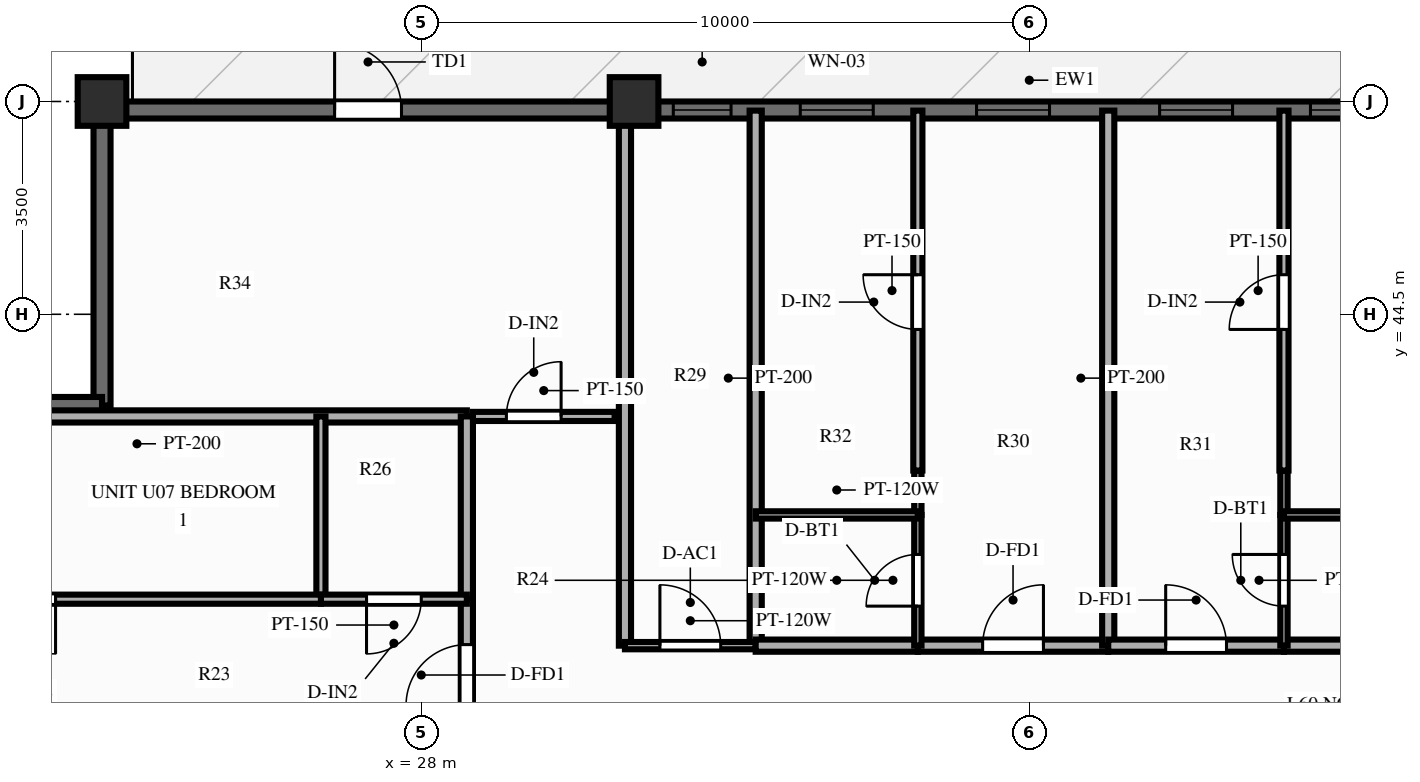
"""IFC4 building model, lengths in metres.
Left out: names, types, materials, properties, quantities, classifications, styles, units other than length and angle.
Written with IfcOpenShell. Run it as: python <this file> out.ifc"""

import sys

from ifc_helpers import new_model, si_unit, direction, frame, frame_2d, origin, origin_2d, place, context, subcontext, project, spatial, rectangle, extrude, source, transform, mapped, element, fill, save


model = new_model("IFC4")
c1 = context("Model", 3, precision=1e-05, world=origin(), true_north=direction((0.0, 1.0)))
c2 = subcontext(c1, "Body", "Model", "MODEL_VIEW")
j1 = project(units=[si_unit("LENGTHUNIT", "METRE"), si_unit("PLANEANGLEUNIT", "RADIAN")], contexts=[c1])
p1 = place(None, origin())
s1 = spatial("IfcSite", under=j1, at=p1, CompositionType="ELEMENT")
p2 = place(p1, origin())
s2 = spatial("IfcBuilding", under=s1, at=p2, CompositionType="ELEMENT")
p3 = place(p2, frame((0.0, 0.0, 192.7)))
s3 = spatial("IfcBuildingStorey", under=s2, at=p3, CompositionType="ELEMENT", Elevation=192.7)
m1 = source(origin(), c2, "Body", "SweptSolid", [
    extrude(rectangle(XDim=0.8, YDim=0.8, at=origin_2d()), origin(), (0.0, 0.0, 1.0), 3.9),
])
for number, where, z_axis, x_axis in (
    (1, (31.5, 48.0, 0.0), (0.0, 0.0, 1.0), (1.0, 0.0, 0.0)),
    (2, (22.75, 48.0, 0.0), (0.0, 0.0, 1.0), (1.0, 0.0, 0.0)),
):
    element("IfcColumn", number, at=place(p3, frame(where, z_axis=z_axis, x_axis=x_axis)), inside=s3, PredefinedType="COLUMN", context=c2, shape_type="MappedRepresentation", body=[
        mapped(m1, transform((0.0, 0.0, 0.0), scale=1.0)),
    ])
p4 = place(p3, frame((22.75, 47.86, 0.0), z_axis=(0.0, 0.0, 1.0), x_axis=(1.0, 0.0, 0.0)))
e3 = element("IfcWall", 3, at=p4, inside=s3, PredefinedType="SOLIDWALL", context=c2, shape_type="SweptSolid", body=[
    extrude(rectangle(XDim=30.5, YDim=0.28, at=frame_2d((15.25, 0.0))), origin(), (0.0, 0.0, 1.0), 2.44),
])
p5 = place(p4, frame((3.825, 0.0, 0.0)))
e4 = element("IfcOpeningElement", 4, at=p5, cuts=e3, PredefinedType="OPENING", context=c2, shape_type="SweptSolid", body=[
    extrude(rectangle(XDim=1.1, YDim=2.15, at=frame_2d((0.55, 1.075))), frame((0.0, 0.152, 0.0), z_axis=(0.0, -1.0, 0.0), x_axis=(1.0, 0.0, 0.0)), (0.0, 0.0, 1.0), 0.304),
])
p6 = place(p4, frame((9.395, 0.0, 0.25)))
e5 = element("IfcOpeningElement", 5, at=p6, cuts=e3, PredefinedType="OPENING", context=c2, shape_type="SweptSolid", body=[
    extrude(rectangle(XDim=0.95, YDim=1.5, at=frame_2d((0.475, 0.75))), frame((0.0, 0.152, 0.0), z_axis=(0.0, -1.0, 0.0), x_axis=(1.0, 0.0, 0.0)), (0.0, 0.0, 1.0), 0.304),
])
p7 = place(p4, frame((11.483, 0.0, 0.25)))
e6 = element("IfcOpeningElement", 6, at=p7, cuts=e3, PredefinedType="OPENING", context=c2, shape_type="SweptSolid", body=[
    extrude(rectangle(XDim=1.2, YDim=1.5, at=frame_2d((0.6, 0.75))), frame((0.0, 0.152, 0.0), z_axis=(0.0, -1.0, 0.0), x_axis=(1.0, 0.0, 0.0)), (0.0, 0.0, 1.0), 0.304),
])
p8 = place(p4, frame((14.383, 0.0, 0.25)))
e7 = element("IfcOpeningElement", 7, at=p8, cuts=e3, PredefinedType="OPENING", context=c2, shape_type="SweptSolid", body=[
    extrude(rectangle(XDim=1.2, YDim=1.5, at=frame_2d((0.6, 0.75))), frame((0.0, 0.152, 0.0), z_axis=(0.0, -1.0, 0.0), x_axis=(1.0, 0.0, 0.0)), (0.0, 0.0, 1.0), 0.304),
])
p9 = place(p4, frame((17.393, 0.0, 0.25)))
e8 = element("IfcOpeningElement", 8, at=p9, cuts=e3, PredefinedType="OPENING", context=c2, shape_type="SweptSolid", body=[
    extrude(rectangle(XDim=1.2, YDim=1.5, at=frame_2d((0.6, 0.75))), frame((0.0, 0.152, 0.0), z_axis=(0.0, -1.0, 0.0), x_axis=(1.0, 0.0, 0.0)), (0.0, 0.0, 1.0), 0.304),
])
p10 = place(p4, frame((19.874, 0.0, 0.25)))
e9 = element("IfcOpeningElement", 9, at=p10, cuts=e3, PredefinedType="OPENING", context=c2, shape_type="SweptSolid", body=[
    extrude(rectangle(XDim=1.2, YDim=1.5, at=frame_2d((0.6, 0.75))), frame((0.0, 0.152, 0.0), z_axis=(0.0, -1.0, 0.0), x_axis=(1.0, 0.0, 0.0)), (0.0, 0.0, 1.0), 0.304),
])
p11 = place(p4, frame((25.525, 0.0, 0.25)))
e10 = element("IfcOpeningElement", 10, at=p11, cuts=e3, PredefinedType="OPENING", context=c2, shape_type="SweptSolid", body=[
    extrude(rectangle(XDim=1.2, YDim=1.5, at=frame_2d((0.6, 0.75))), frame((0.0, 0.152, 0.0), z_axis=(0.0, -1.0, 0.0), x_axis=(1.0, 0.0, 0.0)), (0.0, 0.0, 1.0), 0.304),
])
for number, where, z_axis, x_axis in (
    (11, (22.75, 43.0, 0.0), (0.0, 0.0, 1.0), (0.0, 1.0, 0.0)),
    (12, (17.83, 43.0, 0.0), (0.0, 0.0, 1.0), (1.0, 0.0, 0.0)),
):
    element("IfcWall", number, at=place(p3, frame(where, z_axis=z_axis, x_axis=x_axis)), inside=s3, PredefinedType="SOLIDWALL", context=c2, shape_type="SweptSolid", body=[
        extrude(rectangle(XDim=4.92, YDim=0.28, at=frame_2d((2.46, 0.0))), origin(), (0.0, 0.0, 1.0), 2.44),
    ])
p12 = place(p3, frame((28.85, 42.82, 0.0), z_axis=(0.0, 0.0, 1.0), x_axis=(1.0, 0.0, 0.0)))
e13 = element("IfcWall", 13, at=p12, inside=s3, PredefinedType="PARTITIONING", context=c2, shape_type="SweptSolid", body=[
    extrude(rectangle(XDim=2.33, YDim=0.15, at=frame_2d((1.165, 0.0))), origin(), (0.0, 0.0, 1.0), 2.24),
])
p13 = place(p12, frame((0.55, 0.0, 0.0)))
e14 = element("IfcOpeningElement", 14, at=p13, cuts=e13, PredefinedType="OPENING", context=c2, shape_type="SweptSolid", body=[
    extrude(rectangle(XDim=0.9, YDim=2.1, at=frame_2d((0.45, 1.05))), frame((0.0, 0.087, 0.0), z_axis=(0.0, -1.0, 0.0), x_axis=(1.0, 0.0, 0.0)), (0.0, 0.0, 1.0), 0.174),
])
p14 = place(p3, frame((31.35, 39.05, 0.0), z_axis=(0.0, 0.0, 1.0), x_axis=(0.0, 1.0, 0.0)))
e15 = element("IfcWall", 15, at=p14, inside=s3, PredefinedType="PARTITIONING", context=c2, shape_type="SweptSolid", body=[
    extrude(rectangle(XDim=8.8, YDim=0.2, at=frame_2d((4.4, 0.0))), origin(), (0.0, 0.0, 1.0), 2.44),
])
p15 = place(p3, frame((33.5, 39.05, 0.0), z_axis=(0.0, 0.0, 1.0), x_axis=(0.0, 1.0, 0.0)))
e16 = element("IfcWall", 16, at=p15, inside=s3, PredefinedType="PARTITIONING", context=c2, shape_type="SweptSolid", body=[
    extrude(rectangle(XDim=8.8, YDim=0.2, at=frame_2d((4.4, 0.0))), origin(), (0.0, 0.0, 1.0), 3.56),
])
p16 = place(p3, frame((31.35, 39.05, 0.0), z_axis=(0.0, 0.0, 1.0), x_axis=(1.0, 0.0, 0.0)))
e17 = element("IfcWall", 17, at=p16, inside=s3, PredefinedType="PARTITIONING", context=c2, shape_type="SweptSolid", body=[
    extrude(rectangle(XDim=2.15, YDim=0.12, at=frame_2d((1.075, 0.0))), origin(), (0.0, 0.0, 1.0), 3.56),
])
p17 = place(p16, frame((0.575, 0.0, 0.0)))
e18 = element("IfcOpeningElement", 18, at=p17, cuts=e17, PredefinedType="OPENING", context=c2, shape_type="SweptSolid", body=[
    extrude(rectangle(XDim=1.0, YDim=2.1, at=frame_2d((0.5, 1.05))), frame((0.0, 0.072, 0.0), z_axis=(0.0, -1.0, 0.0), x_axis=(1.0, 0.0, 0.0)), (0.0, 0.0, 1.0), 0.144),
])
p18 = place(p3, frame((33.5, 39.05, 0.0), z_axis=(0.0, 0.0, 1.0), x_axis=(1.0, 0.0, 0.0)))
e19 = element("IfcWall", 19, at=p18, inside=s3, PredefinedType="PARTITIONING", context=c2, shape_type="SweptSolid", body=[
    extrude(rectangle(XDim=2.667, YDim=0.2, at=frame_2d((1.333, 0.0))), origin(), (0.0, 0.0, 1.0), 3.56),
])
p19 = place(p3, frame((36.167, 39.05, 0.0), z_axis=(0.0, 0.0, 1.0), x_axis=(1.0, 0.0, 0.0)))
e20 = element("IfcWall", 20, at=p19, inside=s3, PredefinedType="PARTITIONING", context=c2, shape_type="SweptSolid", body=[
    extrude(rectangle(XDim=3.131, YDim=0.2, at=frame_2d((1.565, 0.0))), origin(), (0.0, 0.0, 1.0), 3.56),
])
p20 = place(p19, frame((1.065, 0.0, 0.0)))
e21 = element("IfcOpeningElement", 21, at=p20, cuts=e20, PredefinedType="OPENING", context=c2, shape_type="SweptSolid", body=[
    extrude(rectangle(XDim=1.0, YDim=2.15, at=frame_2d((0.5, 1.075))), frame((0.0, 0.112, 0.0), z_axis=(0.0, -1.0, 0.0), x_axis=(1.0, 0.0, 0.0)), (0.0, 0.0, 1.0), 0.224),
])
p21 = place(p3, frame((36.167, 39.05, 0.0), z_axis=(0.0, 0.0, 1.0), x_axis=(0.0, 1.0, 0.0)))
e22 = element("IfcWall", 22, at=p21, inside=s3, PredefinedType="PARTITIONING", context=c2, shape_type="SweptSolid", body=[
    extrude(rectangle(XDim=2.15, YDim=0.12, at=frame_2d((1.075, 0.0))), origin(), (0.0, 0.0, 1.0), 3.56),
])
p22 = place(p21, frame((0.65, 0.0, 0.0)))
e23 = element("IfcOpeningElement", 23, at=p22, cuts=e22, PredefinedType="OPENING", context=c2, shape_type="SweptSolid", body=[
    extrude(rectangle(XDim=0.85, YDim=2.05, at=frame_2d((0.425, 1.025))), frame((0.0, 0.072, 0.0), z_axis=(0.0, -1.0, 0.0), x_axis=(1.0, 0.0, 0.0)), (0.0, 0.0, 1.0), 0.144),
])
p23 = place(p3, frame((36.167, 41.2, 0.0), z_axis=(0.0, 0.0, 1.0), x_axis=(0.0, 1.0, 0.0)))
e24 = element("IfcWall", 24, at=p23, inside=s3, PredefinedType="PARTITIONING", context=c2, shape_type="SweptSolid", body=[
    extrude(rectangle(XDim=0.73, YDim=0.12, at=frame_2d((0.365, 0.0))), origin(), (0.0, 0.0, 1.0), 3.56),
])
p24 = place(p3, frame((33.5, 41.2, 0.0), z_axis=(0.0, 0.0, 1.0), x_axis=(1.0, 0.0, 0.0)))
e25 = element("IfcWall", 25, at=p24, inside=s3, PredefinedType="PARTITIONING", context=c2, shape_type="SweptSolid", body=[
    extrude(rectangle(XDim=2.667, YDim=0.12, at=frame_2d((1.333, 0.0))), origin(), (0.0, 0.0, 1.0), 3.56),
])
p25 = place(p3, frame((36.167, 41.93, 0.0), z_axis=(0.0, 0.0, 1.0), x_axis=(0.0, 1.0, 0.0)))
e26 = element("IfcWall", 26, at=p25, inside=s3, PredefinedType="PARTITIONING", context=c2, shape_type="SweptSolid", body=[
    extrude(rectangle(XDim=5.92, YDim=0.15, at=frame_2d((2.96, 0.0))), origin(), (0.0, 0.0, 1.0), 3.56),
])
p26 = place(p25, frame((2.321, 0.0, 0.0)))
e27 = element("IfcOpeningElement", 27, at=p26, cuts=e26, PredefinedType="OPENING", context=c2, shape_type="SweptSolid", body=[
    extrude(rectangle(XDim=0.9, YDim=2.1, at=frame_2d((0.45, 1.05))), frame((0.0, 0.087, 0.0), z_axis=(0.0, -1.0, 0.0), x_axis=(1.0, 0.0, 0.0)), (0.0, 0.0, 1.0), 0.174),
])
p27 = place(p3, frame((39.298, 39.05, 0.0), z_axis=(0.0, 0.0, 1.0), x_axis=(0.0, 1.0, 0.0)))
e28 = element("IfcWall", 28, at=p27, inside=s3, PredefinedType="PARTITIONING", context=c2, shape_type="SweptSolid", body=[
    extrude(rectangle(XDim=8.8, YDim=0.2, at=frame_2d((4.4, 0.0))), origin(), (0.0, 0.0, 1.0), 3.56),
])
p28 = place(p3, frame((39.298, 39.05, 0.0), z_axis=(0.0, 0.0, 1.0), x_axis=(1.0, 0.0, 0.0)))
e29 = element("IfcWall", 29, at=p28, inside=s3, PredefinedType="PARTITIONING", context=c2, shape_type="SweptSolid", body=[
    extrude(rectangle(XDim=2.89, YDim=0.2, at=frame_2d((1.445, 0.0))), origin(), (0.0, 0.0, 1.0), 3.56),
])
p29 = place(p28, frame((0.945, 0.0, 0.0)))
e30 = element("IfcOpeningElement", 30, at=p29, cuts=e29, PredefinedType="OPENING", context=c2, shape_type="SweptSolid", body=[
    extrude(rectangle(XDim=1.0, YDim=2.15, at=frame_2d((0.5, 1.075))), frame((0.0, 0.112, 0.0), z_axis=(0.0, -1.0, 0.0), x_axis=(1.0, 0.0, 0.0)), (0.0, 0.0, 1.0), 0.224),
])
p30 = place(p3, frame((42.188, 39.05, 0.0), z_axis=(0.0, 0.0, 1.0), x_axis=(1.0, 0.0, 0.0)))
e31 = element("IfcWall", 31, at=p30, inside=s3, PredefinedType="PARTITIONING", context=c2, shape_type="SweptSolid", body=[
    extrude(rectangle(XDim=2.462, YDim=0.2, at=frame_2d((1.231, 0.0))), origin(), (0.0, 0.0, 1.0), 3.56),
])
p31 = place(p3, frame((42.188, 39.05, 0.0), z_axis=(0.0, 0.0, 1.0), x_axis=(0.0, 1.0, 0.0)))
e32 = element("IfcWall", 32, at=p31, inside=s3, PredefinedType="PARTITIONING", context=c2, shape_type="SweptSolid", body=[
    extrude(rectangle(XDim=2.15, YDim=0.12, at=frame_2d((1.075, 0.0))), origin(), (0.0, 0.0, 1.0), 3.56),
])
p32 = place(p31, frame((0.65, 0.0, 0.0)))
e33 = element("IfcOpeningElement", 33, at=p32, cuts=e32, PredefinedType="OPENING", context=c2, shape_type="SweptSolid", body=[
    extrude(rectangle(XDim=0.85, YDim=2.05, at=frame_2d((0.425, 1.025))), frame((0.0, 0.072, 0.0), z_axis=(0.0, -1.0, 0.0), x_axis=(1.0, 0.0, 0.0)), (0.0, 0.0, 1.0), 0.144),
])
p33 = place(p3, frame((42.188, 41.2, 0.0), z_axis=(0.0, 0.0, 1.0), x_axis=(0.0, 1.0, 0.0)))
e34 = element("IfcWall", 34, at=p33, inside=s3, PredefinedType="PARTITIONING", context=c2, shape_type="SweptSolid", body=[
    extrude(rectangle(XDim=0.73, YDim=0.12, at=frame_2d((0.365, 0.0))), origin(), (0.0, 0.0, 1.0), 3.56),
])
p34 = place(p3, frame((42.188, 41.2, 0.0), z_axis=(0.0, 0.0, 1.0), x_axis=(1.0, 0.0, 0.0)))
e35 = element("IfcWall", 35, at=p34, inside=s3, PredefinedType="PARTITIONING", context=c2, shape_type="SweptSolid", body=[
    extrude(rectangle(XDim=2.462, YDim=0.12, at=frame_2d((1.231, 0.0))), origin(), (0.0, 0.0, 1.0), 3.56),
])
p35 = place(p3, frame((42.188, 41.93, 0.0), z_axis=(0.0, 0.0, 1.0), x_axis=(0.0, 1.0, 0.0)))
e36 = element("IfcWall", 36, at=p35, inside=s3, PredefinedType="PARTITIONING", context=c2, shape_type="SweptSolid", body=[
    extrude(rectangle(XDim=5.92, YDim=0.15, at=frame_2d((2.96, 0.0))), origin(), (0.0, 0.0, 1.0), 3.56),
])
p36 = place(p35, frame((2.321, 0.0, 0.0)))
e37 = element("IfcOpeningElement", 37, at=p36, cuts=e36, PredefinedType="OPENING", context=c2, shape_type="SweptSolid", body=[
    extrude(rectangle(XDim=0.9, YDim=2.1, at=frame_2d((0.45, 1.05))), frame((0.0, 0.087, 0.0), z_axis=(0.0, -1.0, 0.0), x_axis=(1.0, 0.0, 0.0)), (0.0, 0.0, 1.0), 0.174),
])
p37 = place(p3, frame((28.75, 42.82, 0.0), z_axis=(0.0, 0.0, 1.0), x_axis=(-1.0, 0.0, 0.0)))
e38 = element("IfcWall", 38, at=p37, inside=s3, PredefinedType="PARTITIONING", context=c2, shape_type="SweptSolid", body=[
    extrude(rectangle(XDim=10.85, YDim=0.2, at=frame_2d((5.425, 0.0))), origin(), (0.0, 0.0, 1.0), 2.24),
])
p38 = place(p3, frame((28.75, 37.32, 0.0), z_axis=(0.0, 0.0, 1.0), x_axis=(0.0, 1.0, 0.0)))
e39 = element("IfcWall", 39, at=p38, inside=s3, PredefinedType="PARTITIONING", context=c2, shape_type="SweptSolid", body=[
    extrude(rectangle(XDim=2.494, YDim=0.2, at=frame_2d((1.247, 0.0))), origin(), (0.0, 0.0, 1.0), 3.56),
])
p39 = place(p38, frame((0.747, 0.0, 0.0)))
e40 = element("IfcOpeningElement", 40, at=p39, cuts=e39, PredefinedType="OPENING", context=c2, shape_type="SweptSolid", body=[
    extrude(rectangle(XDim=1.0, YDim=2.15, at=frame_2d((0.5, 1.075))), frame((0.0, 0.112, 0.0), z_axis=(0.0, -1.0, 0.0), x_axis=(1.0, 0.0, 0.0)), (0.0, 0.0, 1.0), 0.224),
])
p40 = place(p3, frame((28.75, 39.814, 0.0), z_axis=(0.0, 0.0, 1.0), x_axis=(0.0, 1.0, 0.0)))
e41 = element("IfcWall", 41, at=p40, inside=s3, PredefinedType="PARTITIONING", context=c2, shape_type="SweptSolid", body=[
    extrude(rectangle(XDim=3.006, YDim=0.2, at=frame_2d((1.503, 0.0))), origin(), (0.0, 0.0, 1.0), 3.56),
])
p41 = place(p3, frame((26.35, 39.814, 0.0), z_axis=(0.0, 0.0, 1.0), x_axis=(0.0, 1.0, 0.0)))
e42 = element("IfcWall", 42, at=p41, inside=s3, PredefinedType="PARTITIONING", context=c2, shape_type="SweptSolid", body=[
    extrude(rectangle(XDim=3.006, YDim=0.15, at=frame_2d((1.503, 0.0))), origin(), (0.0, 0.0, 1.0), 3.56),
])
p42 = place(p3, frame((28.75, 39.814, 0.0), z_axis=(0.0, 0.0, 1.0), x_axis=(-1.0, 0.0, 0.0)))
e43 = element("IfcWall", 43, at=p42, inside=s3, PredefinedType="PARTITIONING", context=c2, shape_type="SweptSolid", body=[
    extrude(rectangle(XDim=2.4, YDim=0.15, at=frame_2d((1.2, 0.0))), origin(), (0.0, 0.0, 1.0), 3.56),
])
p43 = place(p42, frame((0.75, 0.0, 0.0)))
e44 = element("IfcOpeningElement", 44, at=p43, cuts=e43, PredefinedType="OPENING", context=c2, shape_type="SweptSolid", body=[
    extrude(rectangle(XDim=0.9, YDim=2.1, at=frame_2d((0.45, 1.05))), frame((0.0, 0.087, 0.0), z_axis=(0.0, -1.0, 0.0), x_axis=(1.0, 0.0, 0.0)), (0.0, 0.0, 1.0), 0.174),
])
p44 = place(p3, frame((26.35, 39.814, 0.0), z_axis=(0.0, 0.0, 1.0), x_axis=(-1.0, 0.0, 0.0)))
e45 = element("IfcWall", 45, at=p44, inside=s3, PredefinedType="PARTITIONING", context=c2, shape_type="SweptSolid", body=[
    extrude(rectangle(XDim=8.45, YDim=0.15, at=frame_2d((4.225, 0.0))), origin(), (0.0, 0.0, 1.0), 3.56),
])
p45 = place(p44, frame((4.364, 0.0, 0.0)))
e46 = element("IfcOpeningElement", 46, at=p45, cuts=e45, PredefinedType="OPENING", context=c2, shape_type="SweptSolid", body=[
    extrude(rectangle(XDim=0.9, YDim=2.1, at=frame_2d((0.45, 1.05))), frame((0.0, 0.087, 0.0), z_axis=(0.0, -1.0, 0.0), x_axis=(1.0, 0.0, 0.0)), (0.0, 0.0, 1.0), 0.174),
])
m2 = source(origin(), c2, "Body", "SweptSolid", [
    extrude(rectangle(XDim=1.1, YDim=2.15, at=frame_2d((0.55, 1.075))), frame((0.0, 0.025, 0.0), z_axis=(0.0, -1.0, 0.0), x_axis=(1.0, 0.0, 0.0)), (0.0, 0.0, 1.0), 0.05),
])
p46 = place(p5, origin())
e47 = element("IfcDoor", 47, at=p46, inside=s3, OperationType="SINGLE_SWING_LEFT", PredefinedType="DOOR", context=c2, shape_type="MappedRepresentation", body=[
    mapped(m2, transform((0.0, 0.0, 0.0), scale=1.0)),
])
fill(e4, e47)
m3 = source(origin(), c2, "Body", "SweptSolid", [
    extrude(rectangle(XDim=0.95, YDim=1.5, at=frame_2d((0.475, 0.75))), frame((0.0, 0.03, 0.0), z_axis=(0.0, -1.0, 0.0), x_axis=(1.0, 0.0, 0.0)), (0.0, 0.0, 1.0), 0.06),
])
p47 = place(p6, origin())
e48 = element("IfcWindow", 48, at=p47, inside=s3, PartitioningType="SINGLE_PANEL", PredefinedType="WINDOW", context=c2, shape_type="MappedRepresentation", body=[
    mapped(m3, transform((0.0, 0.0, 0.0), scale=1.0)),
])
fill(e5, e48)
m4 = source(origin(), c2, "Body", "SweptSolid", [
    extrude(rectangle(XDim=1.2, YDim=1.5, at=frame_2d((0.6, 0.75))), frame((0.0, 0.03, 0.0), z_axis=(0.0, -1.0, 0.0), x_axis=(1.0, 0.0, 0.0)), (0.0, 0.0, 1.0), 0.06),
])
p48 = place(p7, origin())
e49 = element("IfcWindow", 49, at=p48, inside=s3, PartitioningType="SINGLE_PANEL", PredefinedType="WINDOW", context=c2, shape_type="MappedRepresentation", body=[
    mapped(m4, transform((0.0, 0.0, 0.0), scale=1.0)),
])
fill(e6, e49)
p49 = place(p8, origin())
e50 = element("IfcWindow", 50, at=p49, inside=s3, PartitioningType="SINGLE_PANEL", PredefinedType="WINDOW", context=c2, shape_type="MappedRepresentation", body=[
    mapped(m4, transform((0.0, 0.0, 0.0), scale=1.0)),
])
fill(e7, e50)
p50 = place(p9, origin())
e51 = element("IfcWindow", 51, at=p50, inside=s3, PartitioningType="SINGLE_PANEL", PredefinedType="WINDOW", context=c2, shape_type="MappedRepresentation", body=[
    mapped(m4, transform((0.0, 0.0, 0.0), scale=1.0)),
])
fill(e8, e51)
p51 = place(p10, origin())
e52 = element("IfcWindow", 52, at=p51, inside=s3, PartitioningType="SINGLE_PANEL", PredefinedType="WINDOW", context=c2, shape_type="MappedRepresentation", body=[
    mapped(m4, transform((0.0, 0.0, 0.0), scale=1.0)),
])
fill(e9, e52)
m5 = source(origin(), c2, "Body", "SweptSolid", [
    extrude(rectangle(XDim=0.9, YDim=2.1, at=frame_2d((0.45, 1.05))), frame((0.0, 0.025, 0.0), z_axis=(0.0, -1.0, 0.0), x_axis=(1.0, 0.0, 0.0)), (0.0, 0.0, 1.0), 0.05),
])
p52 = place(p13, origin())
e53 = element("IfcDoor", 53, at=p52, inside=s3, OperationType="SINGLE_SWING_RIGHT", PredefinedType="DOOR", context=c2, shape_type="MappedRepresentation", body=[
    mapped(m5, transform((0.0, 0.0, 0.0), scale=1.0)),
])
fill(e14, e53)
m6 = source(origin(), c2, "Body", "SweptSolid", [
    extrude(rectangle(XDim=1.0, YDim=2.1, at=frame_2d((0.5, 1.05))), frame((0.0, 0.025, 0.0), z_axis=(0.0, -1.0, 0.0), x_axis=(1.0, 0.0, 0.0)), (0.0, 0.0, 1.0), 0.05),
])
p53 = place(p17, origin())
e54 = element("IfcDoor", 54, at=p53, inside=s3, OperationType="SINGLE_SWING_LEFT", PredefinedType="DOOR", context=c2, shape_type="MappedRepresentation", body=[
    mapped(m6, transform((0.0, 0.0, 0.0), scale=1.0)),
])
fill(e18, e54)
m7 = source(origin(), c2, "Body", "SweptSolid", [
    extrude(rectangle(XDim=1.0, YDim=2.15, at=frame_2d((0.5, 1.075))), frame((0.0, 0.025, 0.0), z_axis=(0.0, -1.0, 0.0), x_axis=(1.0, 0.0, 0.0)), (0.0, 0.0, 1.0), 0.05),
])
p54 = place(p20, origin())
e55 = element("IfcDoor", 55, at=p54, inside=s3, OperationType="SINGLE_SWING_RIGHT", PredefinedType="DOOR", context=c2, shape_type="MappedRepresentation", body=[
    mapped(m7, transform((0.0, 0.0, 0.0), scale=1.0)),
])
fill(e21, e55)
m8 = source(origin(), c2, "Body", "SweptSolid", [
    extrude(rectangle(XDim=0.85, YDim=2.05, at=frame_2d((0.425, 1.025))), frame((0.0, 0.025, 0.0), z_axis=(0.0, -1.0, 0.0), x_axis=(1.0, 0.0, 0.0)), (0.0, 0.0, 1.0), 0.05),
])
p55 = place(p22, origin())
e56 = element("IfcDoor", 56, at=p55, inside=s3, OperationType="SINGLE_SWING_LEFT", PredefinedType="DOOR", context=c2, shape_type="MappedRepresentation", body=[
    mapped(m8, transform((0.0, 0.0, 0.0), scale=1.0)),
])
fill(e23, e56)
p56 = place(p26, origin())
e57 = element("IfcDoor", 57, at=p56, inside=s3, OperationType="SINGLE_SWING_RIGHT", PredefinedType="DOOR", context=c2, shape_type="MappedRepresentation", body=[
    mapped(m5, transform((0.0, 0.0, 0.0), scale=1.0)),
])
fill(e27, e57)
p57 = place(p29, origin())
e58 = element("IfcDoor", 58, at=p57, inside=s3, OperationType="SINGLE_SWING_LEFT", PredefinedType="DOOR", context=c2, shape_type="MappedRepresentation", body=[
    mapped(m7, transform((0.0, 0.0, 0.0), scale=1.0)),
])
fill(e30, e58)
p58 = place(p32, origin())
e59 = element("IfcDoor", 59, at=p58, inside=s3, OperationType="SINGLE_SWING_RIGHT", PredefinedType="DOOR", context=c2, shape_type="MappedRepresentation", body=[
    mapped(m8, transform((0.0, 0.0, 0.0), scale=1.0)),
])
fill(e33, e59)
p59 = place(p36, origin())
e60 = element("IfcDoor", 60, at=p59, inside=s3, OperationType="SINGLE_SWING_LEFT", PredefinedType="DOOR", context=c2, shape_type="MappedRepresentation", body=[
    mapped(m5, transform((0.0, 0.0, 0.0), scale=1.0)),
])
fill(e37, e60)
p60 = place(p39, origin())
e61 = element("IfcDoor", 61, at=p60, inside=s3, OperationType="SINGLE_SWING_LEFT", PredefinedType="DOOR", context=c2, shape_type="MappedRepresentation", body=[
    mapped(m7, transform((0.0, 0.0, 0.0), scale=1.0)),
])
fill(e40, e61)
p61 = place(p43, origin())
e62 = element("IfcDoor", 62, at=p61, inside=s3, OperationType="SINGLE_SWING_RIGHT", PredefinedType="DOOR", context=c2, shape_type="MappedRepresentation", body=[
    mapped(m5, transform((0.0, 0.0, 0.0), scale=1.0)),
])
fill(e44, e62)
p62 = place(p45, origin())
e63 = element("IfcDoor", 63, at=p62, inside=s3, OperationType="SINGLE_SWING_LEFT", PredefinedType="DOOR", context=c2, shape_type="MappedRepresentation", body=[
    mapped(m5, transform((0.0, 0.0, 0.0), scale=1.0)),
])
fill(e46, e63)
save(model, sys.argv[1])
